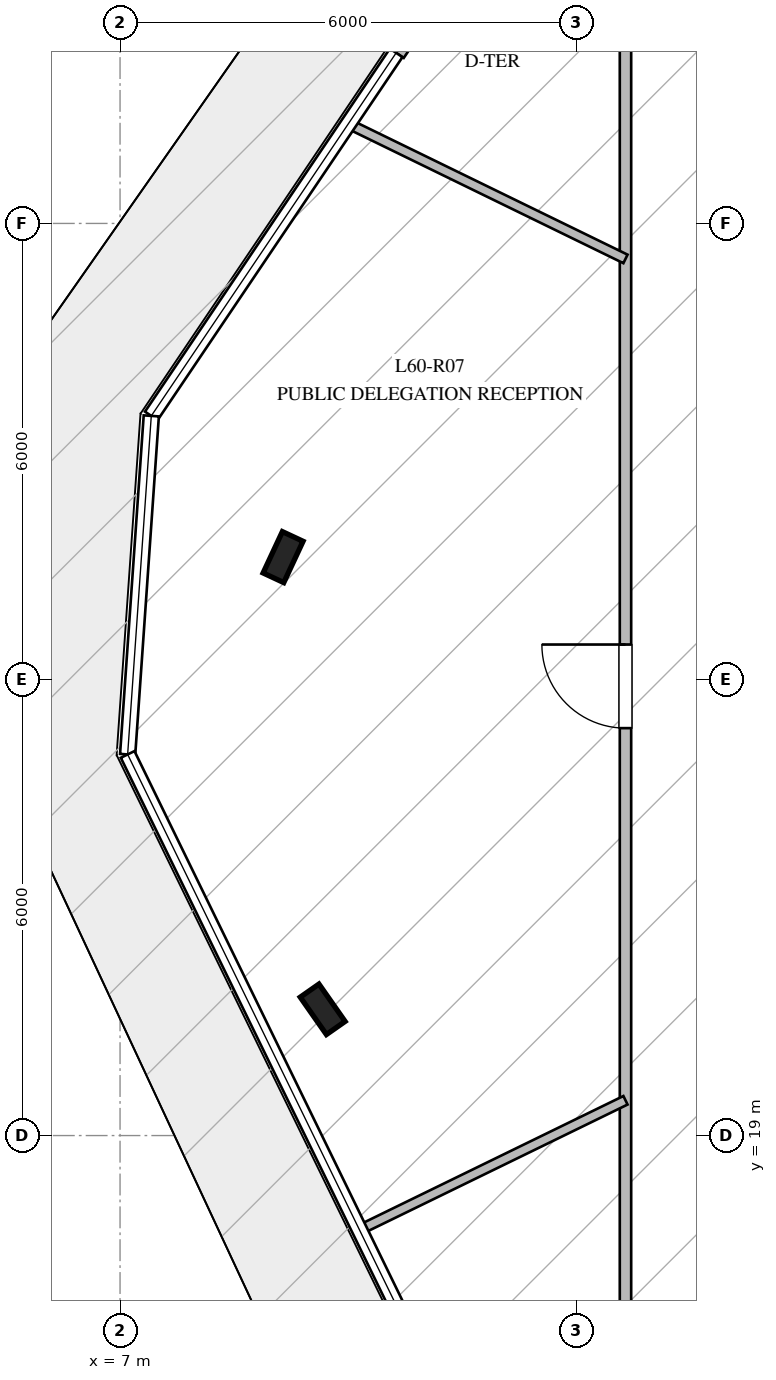
"""IFC4 building model, lengths in metres.
Left out: names, types, materials, properties, quantities, classifications, styles, units other than length and angle.
Written with IfcOpenShell. Run it as: python <this file> out.ifc"""

import sys

from ifc_helpers import new_model, si_unit, direction, frame, frame_2d, origin, origin_2d, place, context, subcontext, project, spatial, rectangle, i_section, extrude, element, fill, save


model = new_model("IFC4")
c1 = context("Model", 3, precision=1e-05, world=origin(), true_north=direction((0.0, 1.0)))
c2 = subcontext(c1, "Body", "Model", "MODEL_VIEW")
j1 = project(units=[si_unit("LENGTHUNIT", "METRE"), si_unit("PLANEANGLEUNIT", "RADIAN")], contexts=[c1])
p1 = place(None, origin())
s1 = spatial("IfcSite", under=j1, at=p1, CompositionType="ELEMENT")
p2 = place(p1, origin())
s2 = spatial("IfcBuilding", under=s1, at=p2, CompositionType="ELEMENT")
p3 = place(p2, frame((0.0, 0.0, 250.2)))
s3 = spatial("IfcBuildingStorey", under=s2, at=p3, CompositionType="ELEMENT", Elevation=250.2)
for number, where, z_axis, x_axis in (
    (1, (9.145, 26.61, -0.27), (0.0, 0.0, 1.0), (0.423, 0.906, 0.0)),
    (2, (9.666, 20.661, -0.27), (0.0, 0.0, 1.0), (-0.574, 0.819, 0.0)),
):
    element("IfcColumn", number, at=place(p3, frame(where, z_axis=z_axis, x_axis=x_axis)), inside=s3, PredefinedType="COLUMN", context=c2, shape_type="SweptSolid", body=[
        extrude(i_section(OverallWidth=0.3, OverallDepth=0.6, WebThickness=0.015, FlangeThickness=0.03, at=origin_2d()), origin(), (0.0, 0.0, 1.0), 4.27),
    ])
p4 = place(p3, frame((11.975, 35.234, 0.0), z_axis=(0.0, 0.0, 1.0), x_axis=(-0.559128660759, -0.82908090119, 0.0)))
e3 = element("IfcWall", 3, at=p4, inside=s3, PredefinedType="STANDARD", context=c2, shape_type="SweptSolid", body=[
    extrude(rectangle(XDim=2.4, YDim=0.24, at=frame_2d((1.2, 0.0))), origin(), (0.0, 0.0, 1.0), 3.78),
])
p5 = place(p4, frame((0.4, 0.0, 0.0)))
e4 = element("IfcOpeningElement", 4, at=p5, cuts=e3, PredefinedType="OPENING", context=c2, shape_type="SweptSolid", body=[
    extrude(rectangle(XDim=1.6, YDim=2.25, at=frame_2d((0.8, 1.125))), frame((0.0, 0.13, 0.0), z_axis=(0.0, -1.0, 0.0), x_axis=(1.0, 0.0, 0.0)), (0.0, 0.0, 1.0), 0.26),
])
p6 = place(p3, frame((13.65, 14.25, 0.0), z_axis=(0.0, 0.0, 1.0), x_axis=(0.0, 1.0, 0.0)))
e5 = element("IfcWall", 5, at=p6, inside=s3, PredefinedType="PARTITIONING", context=c2, shape_type="SweptSolid", body=[
    extrude(rectangle(XDim=21.5, YDim=0.15, at=frame_2d((10.75, 0.0))), origin(), (0.0, 0.0, 1.0), 3.25),
])
p7 = place(p6, frame((10.11, 0.0, 0.0)))
e6 = element("IfcOpeningElement", 6, at=p7, cuts=e5, PredefinedType="OPENING", context=c2, shape_type="SweptSolid", body=[
    extrude(rectangle(XDim=1.1, YDim=2.2, at=frame_2d((0.55, 1.1))), frame((0.0, 0.085, 0.0), z_axis=(0.0, -1.0, 0.0), x_axis=(1.0, 0.0, 0.0)), (0.0, 0.0, 1.0), 0.17),
])
p8 = place(p3, frame((13.65, 30.533, 0.0), z_axis=(0.0, 0.0, 1.0), x_axis=(-0.898829990628, 0.438297442324, 0.0)))
e7 = element("IfcWall", 7, at=p8, inside=s3, PredefinedType="PARTITIONING", context=c2, shape_type="SweptSolid", body=[
    extrude(rectangle(XDim=4.041, YDim=0.125, at=frame_2d((2.02, 0.0))), origin(), (0.0, 0.0, 1.0), 3.28),
])
p9 = place(p3, frame((13.65, 19.464, 0.0), z_axis=(0.0, 0.0, 1.0), x_axis=(-0.898841056679, -0.438274748107, 0.0)))
e8 = element("IfcWall", 8, at=p9, inside=s3, PredefinedType="PARTITIONING", context=c2, shape_type="SweptSolid", body=[
    extrude(rectangle(XDim=3.877, YDim=0.125, at=frame_2d((1.938, 0.0))), origin(), (0.0, 0.0, 1.0), 3.25),
])
p10 = place(p7, origin())
e9 = element("IfcDoor", 9, at=p10, inside=s3, OperationType="SINGLE_SWING_RIGHT", PredefinedType="DOOR", context=c2, shape_type="SweptSolid", body=[
    extrude(rectangle(XDim=1.1, YDim=2.2, at=frame_2d((0.55, 1.1))), frame((0.0, 0.025, 0.0), z_axis=(0.0, -1.0, 0.0), x_axis=(1.0, 0.0, 0.0)), (0.0, 0.0, 1.0), 0.05),
])
fill(e6, e9)
save(model, sys.argv[1])
